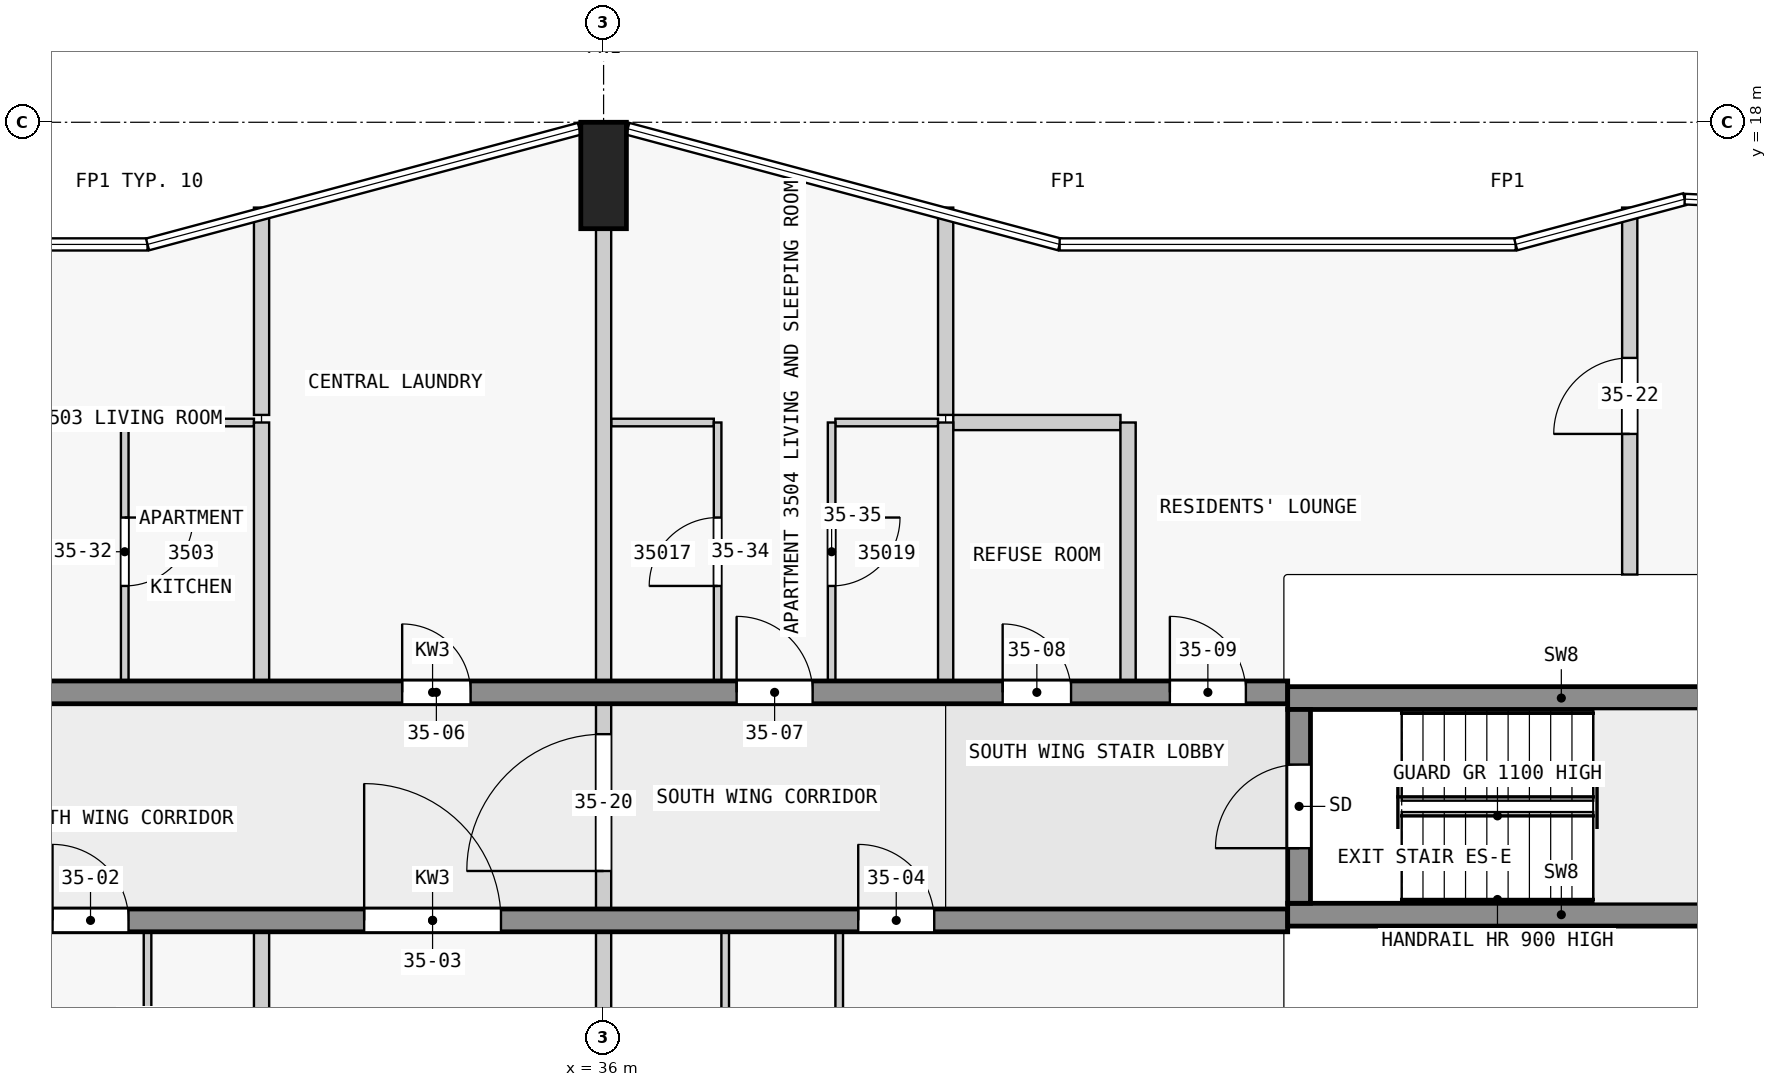
"""IFC4 building model, lengths in metres.
Left out: names, types, materials, properties, quantities, classifications, styles, units other than length and angle.
Written with IfcOpenShell. Run it as: python <this file> out.ifc"""

import sys

from ifc_helpers import new_model, si_unit, direction, frame, frame_2d, origin, origin_2d, place, context, subcontext, project, spatial, rectangle, extrude, element, fill, save


model = new_model("IFC4")
c1 = context("Model", 3, precision=1e-05, world=origin(), true_north=direction((0.0, 1.0)))
c2 = subcontext(c1, "Body", "Model", "MODEL_VIEW")
j1 = project(units=[si_unit("LENGTHUNIT", "METRE"), si_unit("PLANEANGLEUNIT", "RADIAN")], contexts=[c1])
p1 = place(None, origin())
s1 = spatial("IfcSite", under=j1, at=p1, CompositionType="ELEMENT")
p2 = place(p1, origin())
s2 = spatial("IfcBuilding", under=s1, at=p2, CompositionType="ELEMENT")
p3 = place(p2, frame((0.0, 0.0, 139.4)))
s3 = spatial("IfcBuildingStorey", under=s2, at=p3, CompositionType="ELEMENT", Elevation=139.4)
p4 = place(p3, frame((36.0, 17.3, 0.0), z_axis=(0.0, 0.0, 1.0), x_axis=(1.0, 0.0, 0.0)))
e1 = element("IfcColumn", 1, at=p4, inside=s3, PredefinedType="COLUMN", context=c2, shape_type="SweptSolid", body=[
    extrude(rectangle(XDim=0.6, YDim=1.4, at=origin_2d()), origin(), (0.0, 0.0, 1.0), 3.5),
])
p5 = place(p3, frame((45.15, 7.725, 0.0), z_axis=(0.0, 0.0, 1.0), x_axis=(0.0, 1.0, 0.0)))
e2 = element("IfcWall", 2, at=p5, inside=s3, PredefinedType="SHEAR", context=c2, shape_type="SweptSolid", body=[
    extrude(rectangle(XDim=2.55, YDim=0.3, at=frame_2d((1.275, 0.0))), origin(), (0.0, 0.0, 1.0), 3.5),
])
p6 = place(p5, frame((0.725, 0.0, 0.0)))
e3 = element("IfcOpeningElement", 3, at=p6, cuts=e2, PredefinedType="OPENING", context=c2, shape_type="SweptSolid", body=[
    extrude(rectangle(XDim=1.1, YDim=2.1, at=frame_2d((0.55, 1.05))), frame((0.0, 0.16, 0.0), z_axis=(0.0, -1.0, 0.0), x_axis=(1.0, 0.0, 0.0)), (0.0, 0.0, 1.0), 0.32),
])
for number, where, z_axis, x_axis in (
    (4, (45.0, 7.575, 0.0), (0.0, 0.0, 1.0), (1.0, 0.0, 0.0)),
    (5, (45.0, 10.425, 0.0), (0.0, 0.0, 1.0), (1.0, 0.0, 0.0)),
):
    element("IfcWall", number, at=place(p3, frame(where, z_axis=z_axis, x_axis=x_axis)), inside=s3, PredefinedType="SHEAR", context=c2, shape_type="SweptSolid", body=[
        extrude(rectangle(XDim=7.2, YDim=0.3, at=frame_2d((3.6, 0.0))), origin(), (0.0, 0.0, 1.0), 3.5),
    ])
p7 = place(p3, frame((22.5, 7.5, 0.0), z_axis=(0.0, 0.0, 1.0), x_axis=(1.0, 0.0, 0.0)))
e6 = element("IfcWall", 6, at=p7, inside=s3, PredefinedType="SHEAR", context=c2, shape_type="SweptSolid", body=[
    extrude(rectangle(XDim=22.5, YDim=0.3, at=frame_2d((11.25, 0.0))), origin(), (0.0, 0.0, 1.0), 3.25),
])
p8 = place(p7, frame((1.75, 0.0, 0.0)))
e7 = element("IfcOpeningElement", 7, at=p8, cuts=e6, PredefinedType="OPENING", context=c2, shape_type="SweptSolid", body=[
    extrude(rectangle(XDim=1.0, YDim=2.1, at=frame_2d((0.5, 1.05))), frame((0.0, 0.16, 0.0), z_axis=(0.0, -1.0, 0.0), x_axis=(1.0, 0.0, 0.0)), (0.0, 0.0, 1.0), 0.32),
])
p9 = place(p7, frame((6.25, 0.0, 0.0)))
e8 = element("IfcOpeningElement", 8, at=p9, cuts=e6, PredefinedType="OPENING", context=c2, shape_type="SweptSolid", body=[
    extrude(rectangle(XDim=1.0, YDim=2.1, at=frame_2d((0.5, 1.05))), frame((0.0, 0.16, 0.0), z_axis=(0.0, -1.0, 0.0), x_axis=(1.0, 0.0, 0.0)), (0.0, 0.0, 1.0), 0.32),
])
p10 = place(p7, frame((10.35, 0.0, 0.0)))
e9 = element("IfcOpeningElement", 9, at=p10, cuts=e6, PredefinedType="OPENING", context=c2, shape_type="SweptSolid", body=[
    extrude(rectangle(XDim=1.8, YDim=2.1, at=frame_2d((0.9, 1.05))), frame((0.0, 0.16, 0.0), z_axis=(0.0, -1.0, 0.0), x_axis=(1.0, 0.0, 0.0)), (0.0, 0.0, 1.0), 0.32),
])
p11 = place(p7, frame((16.85, 0.0, 0.0)))
e10 = element("IfcOpeningElement", 10, at=p11, cuts=e6, PredefinedType="OPENING", context=c2, shape_type="SweptSolid", body=[
    extrude(rectangle(XDim=1.0, YDim=2.1, at=frame_2d((0.5, 1.05))), frame((0.0, 0.16, 0.0), z_axis=(0.0, -1.0, 0.0), x_axis=(1.0, 0.0, 0.0)), (0.0, 0.0, 1.0), 0.32),
])
p12 = place(p3, frame((22.5, 10.5, 0.0), z_axis=(0.0, 0.0, 1.0), x_axis=(1.0, 0.0, 0.0)))
e11 = element("IfcWall", 11, at=p12, inside=s3, PredefinedType="SHEAR", context=c2, shape_type="SweptSolid", body=[
    extrude(rectangle(XDim=22.5, YDim=0.3, at=frame_2d((11.25, 0.0))), origin(), (0.0, 0.0, 1.0), 3.25),
])
p13 = place(p12, frame((4.05, 0.0, 0.0)))
e12 = element("IfcOpeningElement", 12, at=p13, cuts=e11, PredefinedType="OPENING", context=c2, shape_type="SweptSolid", body=[
    extrude(rectangle(XDim=1.0, YDim=2.1, at=frame_2d((0.5, 1.05))), frame((0.0, 0.16, 0.0), z_axis=(0.0, -1.0, 0.0), x_axis=(1.0, 0.0, 0.0)), (0.0, 0.0, 1.0), 0.32),
])
p14 = place(p12, frame((10.85, 0.0, 0.0)))
e13 = element("IfcOpeningElement", 13, at=p14, cuts=e11, PredefinedType="OPENING", context=c2, shape_type="SweptSolid", body=[
    extrude(rectangle(XDim=0.9, YDim=2.1, at=frame_2d((0.45, 1.05))), frame((0.0, 0.16, 0.0), z_axis=(0.0, -1.0, 0.0), x_axis=(1.0, 0.0, 0.0)), (0.0, 0.0, 1.0), 0.32),
])
p15 = place(p12, frame((15.25, 0.0, 0.0)))
e14 = element("IfcOpeningElement", 14, at=p15, cuts=e11, PredefinedType="OPENING", context=c2, shape_type="SweptSolid", body=[
    extrude(rectangle(XDim=1.0, YDim=2.1, at=frame_2d((0.5, 1.05))), frame((0.0, 0.16, 0.0), z_axis=(0.0, -1.0, 0.0), x_axis=(1.0, 0.0, 0.0)), (0.0, 0.0, 1.0), 0.32),
])
p16 = place(p12, frame((18.75, 0.0, 0.0)))
e15 = element("IfcOpeningElement", 15, at=p16, cuts=e11, PredefinedType="OPENING", context=c2, shape_type="SweptSolid", body=[
    extrude(rectangle(XDim=0.9, YDim=2.1, at=frame_2d((0.45, 1.05))), frame((0.0, 0.16, 0.0), z_axis=(0.0, -1.0, 0.0), x_axis=(1.0, 0.0, 0.0)), (0.0, 0.0, 1.0), 0.32),
])
p17 = place(p12, frame((20.95, 0.0, 0.0)))
e16 = element("IfcOpeningElement", 16, at=p17, cuts=e11, PredefinedType="OPENING", context=c2, shape_type="SweptSolid", body=[
    extrude(rectangle(XDim=1.0, YDim=2.1, at=frame_2d((0.5, 1.05))), frame((0.0, 0.16, 0.0), z_axis=(0.0, -1.0, 0.0), x_axis=(1.0, 0.0, 0.0)), (0.0, 0.0, 1.0), 0.32),
])
p18 = place(p3, frame((31.4, 14.05, 0.0), z_axis=(0.0, 0.0, 1.0), x_axis=(-1.0, 0.0, 0.0)))
e17 = element("IfcWall", 17, at=p18, inside=s3, PredefinedType="PARTITIONING", context=c2, shape_type="SweptSolid", body=[
    extrude(rectangle(XDim=1.65, YDim=0.1, at=frame_2d((0.825, 0.0))), origin(), (0.0, 0.0, 1.0), 3.25),
])
for number, where, z_axis, x_axis in (
    (18, (37.45, 14.05, 0.0), (0.0, 0.0, 1.0), (-1.0, 0.0, 0.0)),
    (19, (40.4, 14.05, 0.0), (0.0, 0.0, 1.0), (-1.0, 0.0, 0.0)),
):
    element("IfcWall", number, at=place(p3, frame(where, z_axis=z_axis, x_axis=x_axis)), inside=s3, PredefinedType="PARTITIONING", context=c2, shape_type="SweptSolid", body=[
        extrude(rectangle(XDim=1.35, YDim=0.1, at=frame_2d((0.675, 0.0))), origin(), (0.0, 0.0, 1.0), 3.25),
    ])
p19 = place(p3, frame((42.8, 14.05, 0.0), z_axis=(0.0, 0.0, 1.0), x_axis=(-1.0, 0.0, 0.0)))
e20 = element("IfcWall", 20, at=p19, inside=s3, PredefinedType="PARTITIONING", context=c2, shape_type="SweptSolid", body=[
    extrude(rectangle(XDim=2.2, YDim=0.2, at=frame_2d((1.1, 0.0))), origin(), (0.0, 0.0, 1.0), 3.25),
])
p20 = place(p3, frame((29.7, 14.05, 0.0), z_axis=(0.0, 0.0, 1.0), x_axis=(0.0, -1.0, 0.0)))
e21 = element("IfcWall", 21, at=p20, inside=s3, PredefinedType="PARTITIONING", context=c2, shape_type="SweptSolid", body=[
    extrude(rectangle(XDim=3.4, YDim=0.1, at=frame_2d((1.7, 0.0))), origin(), (0.0, 0.0, 1.0), 3.25),
])
p21 = place(p20, frame((1.25, 0.0, 0.0)))
e22 = element("IfcOpeningElement", 22, at=p21, cuts=e21, PredefinedType="OPENING", context=c2, shape_type="SweptSolid", body=[
    extrude(rectangle(XDim=0.9, YDim=2.1, at=frame_2d((0.45, 1.05))), frame((0.0, 0.06, 0.0), z_axis=(0.0, -1.0, 0.0), x_axis=(1.0, 0.0, 0.0)), (0.0, 0.0, 1.0), 0.12),
])
p22 = place(p3, frame((30.0, 7.35, 0.0), z_axis=(0.0, 0.0, 1.0), x_axis=(0.0, -1.0, 0.0)))
e23 = element("IfcWall", 23, at=p22, inside=s3, PredefinedType="PARTITIONING", context=c2, shape_type="SweptSolid", body=[
    extrude(rectangle(XDim=3.4, YDim=0.1, at=frame_2d((1.7, 0.0))), origin(), (0.0, 0.0, 1.0), 3.25),
])
p23 = place(p22, frame((1.25, 0.0, 0.0)))
e24 = element("IfcOpeningElement", 24, at=p23, cuts=e23, PredefinedType="OPENING", context=c2, shape_type="SweptSolid", body=[
    extrude(rectangle(XDim=0.9, YDim=2.1, at=frame_2d((0.45, 1.05))), frame((0.0, 0.06, 0.0), z_axis=(0.0, -1.0, 0.0), x_axis=(1.0, 0.0, 0.0)), (0.0, 0.0, 1.0), 0.12),
])
p24 = place(p3, frame((31.5, 16.878, 0.0), z_axis=(0.0, 0.0, 1.0), x_axis=(0.0, -1.0, 0.0)))
e25 = element("IfcWall", 25, at=p24, inside=s3, PredefinedType="PARTITIONING", context=c2, shape_type="SweptSolid", body=[
    extrude(rectangle(XDim=2.728, YDim=0.2, at=frame_2d((1.364, 0.0))), origin(), (0.0, 0.0, 1.0), 3.25),
])
for number, where, z_axis, x_axis in (
    (26, (31.5, 3.95, 0.0), (0.0, 0.0, 1.0), (0.0, 1.0, 0.0)),
    (27, (31.5, 10.65, 0.0), (0.0, 0.0, 1.0), (0.0, 1.0, 0.0)),
):
    element("IfcWall", number, at=place(p3, frame(where, z_axis=z_axis, x_axis=x_axis)), inside=s3, PredefinedType="PARTITIONING", context=c2, shape_type="SweptSolid", body=[
        extrude(rectangle(XDim=3.4, YDim=0.2, at=frame_2d((1.7, 0.0))), origin(), (0.0, 0.0, 1.0), 3.25),
    ])
for number, where, z_axis, x_axis in (
    (28, (36.0, 1.4, 0.0), (0.0, 0.0, 1.0), (0.0, 1.0, 0.0)),
    (29, (36.0, 10.65, 0.0), (0.0, 0.0, 1.0), (0.0, 1.0, 0.0)),
):
    element("IfcWall", number, at=place(p3, frame(where, z_axis=z_axis, x_axis=x_axis)), inside=s3, PredefinedType="PARTITIONING", context=c2, shape_type="SweptSolid", body=[
        extrude(rectangle(XDim=5.95, YDim=0.2, at=frame_2d((2.975, 0.0))), origin(), (0.0, 0.0, 1.0), 3.25),
    ])
p25 = place(p3, frame((37.5, 10.65, 0.0), z_axis=(0.0, 0.0, 1.0), x_axis=(0.0, 1.0, 0.0)))
e30 = element("IfcWall", 30, at=p25, inside=s3, PredefinedType="PARTITIONING", context=c2, shape_type="SweptSolid", body=[
    extrude(rectangle(XDim=3.4, YDim=0.1, at=frame_2d((1.7, 0.0))), origin(), (0.0, 0.0, 1.0), 3.25),
])
p26 = place(p25, frame((1.25, 0.0, 0.0)))
e31 = element("IfcOpeningElement", 31, at=p26, cuts=e30, PredefinedType="OPENING", context=c2, shape_type="SweptSolid", body=[
    extrude(rectangle(XDim=0.9, YDim=2.1, at=frame_2d((0.45, 1.05))), frame((0.0, 0.06, 0.0), z_axis=(0.0, -1.0, 0.0), x_axis=(1.0, 0.0, 0.0)), (0.0, 0.0, 1.0), 0.12),
])
p27 = place(p3, frame((37.6, 3.95, 0.0), z_axis=(0.0, 0.0, 1.0), x_axis=(0.0, 1.0, 0.0)))
e32 = element("IfcWall", 32, at=p27, inside=s3, PredefinedType="PARTITIONING", context=c2, shape_type="SweptSolid", body=[
    extrude(rectangle(XDim=3.4, YDim=0.1, at=frame_2d((1.7, 0.0))), origin(), (0.0, 0.0, 1.0), 3.25),
])
p28 = place(p3, frame((39.0, 14.05, 0.0), z_axis=(0.0, 0.0, 1.0), x_axis=(0.0, -1.0, 0.0)))
e33 = element("IfcWall", 33, at=p28, inside=s3, PredefinedType="PARTITIONING", context=c2, shape_type="SweptSolid", body=[
    extrude(rectangle(XDim=3.4, YDim=0.1, at=frame_2d((1.7, 0.0))), origin(), (0.0, 0.0, 1.0), 3.25),
])
p29 = place(p28, frame((1.25, 0.0, 0.0)))
e34 = element("IfcOpeningElement", 34, at=p29, cuts=e33, PredefinedType="OPENING", context=c2, shape_type="SweptSolid", body=[
    extrude(rectangle(XDim=0.9, YDim=2.1, at=frame_2d((0.45, 1.05))), frame((0.0, 0.06, 0.0), z_axis=(0.0, -1.0, 0.0), x_axis=(1.0, 0.0, 0.0)), (0.0, 0.0, 1.0), 0.12),
])
p30 = place(p3, frame((39.1, 3.95, 0.0), z_axis=(0.0, 0.0, 1.0), x_axis=(0.0, 1.0, 0.0)))
e35 = element("IfcWall", 35, at=p30, inside=s3, PredefinedType="PARTITIONING", context=c2, shape_type="SweptSolid", body=[
    extrude(rectangle(XDim=3.4, YDim=0.1, at=frame_2d((1.7, 0.0))), origin(), (0.0, 0.0, 1.0), 3.25),
])
p31 = place(p30, frame((1.25, 0.0, 0.0)))
e36 = element("IfcOpeningElement", 36, at=p31, cuts=e35, PredefinedType="OPENING", context=c2, shape_type="SweptSolid", body=[
    extrude(rectangle(XDim=0.9, YDim=2.1, at=frame_2d((0.45, 1.05))), frame((0.0, 0.06, 0.0), z_axis=(0.0, -1.0, 0.0), x_axis=(1.0, 0.0, 0.0)), (0.0, 0.0, 1.0), 0.12),
])
p32 = place(p3, frame((40.5, 16.878, 0.0), z_axis=(0.0, 0.0, 1.0), x_axis=(0.0, -1.0, 0.0)))
e37 = element("IfcWall", 37, at=p32, inside=s3, PredefinedType="PARTITIONING", context=c2, shape_type="SweptSolid", body=[
    extrude(rectangle(XDim=2.728, YDim=0.2, at=frame_2d((1.364, 0.0))), origin(), (0.0, 0.0, 1.0), 3.25),
])
for number, where, z_axis, x_axis in (
    (38, (40.5, 10.65, 0.0), (0.0, 0.0, 1.0), (0.0, 1.0, 0.0)),
    (39, (42.9, 10.65, 0.0), (0.0, 0.0, 1.0), (0.0, 1.0, 0.0)),
):
    element("IfcWall", number, at=place(p3, frame(where, z_axis=z_axis, x_axis=x_axis)), inside=s3, PredefinedType="PARTITIONING", context=c2, shape_type="SweptSolid", body=[
        extrude(rectangle(XDim=3.4, YDim=0.2, at=frame_2d((1.7, 0.0))), origin(), (0.0, 0.0, 1.0), 3.25),
    ])
p33 = place(p3, frame((49.5, 12.05, 0.0), z_axis=(0.0, 0.0, 1.0), x_axis=(0.0, 1.0, 0.0)))
e40 = element("IfcWall", 40, at=p33, inside=s3, PredefinedType="PARTITIONING", context=c2, shape_type="SweptSolid", body=[
    extrude(rectangle(XDim=4.828, YDim=0.2, at=frame_2d((2.414, 0.0))), origin(), (0.0, 0.0, 1.0), 3.25),
])
p34 = place(p33, frame((1.85, 0.0, 0.0)))
e41 = element("IfcOpeningElement", 41, at=p34, cuts=e40, PredefinedType="OPENING", context=c2, shape_type="SweptSolid", body=[
    extrude(rectangle(XDim=1.0, YDim=2.1, at=frame_2d((0.5, 1.05))), frame((0.0, 0.11, 0.0), z_axis=(0.0, -1.0, 0.0), x_axis=(1.0, 0.0, 0.0)), (0.0, 0.0, 1.0), 0.22),
])
p35 = place(p3, frame((36.0, 7.45, 0.0), z_axis=(0.0, 0.0, 1.0), x_axis=(0.0, 1.0, 0.0)))
e42 = element("IfcWall", 42, at=p35, inside=s3, PredefinedType="PARTITIONING", context=c2, shape_type="SweptSolid", body=[
    extrude(rectangle(XDim=3.1, YDim=0.2, at=frame_2d((1.55, 0.0))), origin(), (0.0, 0.0, 1.0), 3.25),
])
p36 = place(p35, frame((0.7, 0.0, 0.0)))
e43 = element("IfcOpeningElement", 43, at=p36, cuts=e42, PredefinedType="OPENING", context=c2, shape_type="SweptSolid", body=[
    extrude(rectangle(XDim=1.8, YDim=2.1, at=frame_2d((0.9, 1.05))), frame((0.0, 0.11, 0.0), z_axis=(0.0, -1.0, 0.0), x_axis=(1.0, 0.0, 0.0)), (0.0, 0.0, 1.0), 0.22),
])
p37 = place(p6, origin())
e44 = element("IfcDoor", 44, at=p37, inside=s3, OperationType="SINGLE_SWING_LEFT", PredefinedType="DOOR", context=c2, shape_type="SweptSolid", body=[
    extrude(rectangle(XDim=1.1, YDim=2.1, at=frame_2d((0.55, 1.05))), frame((0.0, 0.025, 0.0), z_axis=(0.0, -1.0, 0.0), x_axis=(1.0, 0.0, 0.0)), (0.0, 0.0, 1.0), 0.05),
])
fill(e3, e44)
p38 = place(p9, origin())
e45 = element("IfcDoor", 45, at=p38, inside=s3, OperationType="SINGLE_SWING_LEFT", PredefinedType="DOOR", context=c2, shape_type="SweptSolid", body=[
    extrude(rectangle(XDim=1.0, YDim=2.1, at=frame_2d((0.5, 1.05))), frame((0.0, 0.025, 0.0), z_axis=(0.0, -1.0, 0.0), x_axis=(1.0, 0.0, 0.0)), (0.0, 0.0, 1.0), 0.05),
])
fill(e8, e45)
p39 = place(p10, origin())
e46 = element("IfcDoor", 46, at=p39, inside=s3, OperationType="SINGLE_SWING_LEFT", PredefinedType="DOOR", context=c2, shape_type="SweptSolid", body=[
    extrude(rectangle(XDim=1.8, YDim=2.1, at=frame_2d((0.9, 1.05))), frame((0.0, 0.025, 0.0), z_axis=(0.0, -1.0, 0.0), x_axis=(1.0, 0.0, 0.0)), (0.0, 0.0, 1.0), 0.05),
])
fill(e9, e46)
p40 = place(p11, origin())
e47 = element("IfcDoor", 47, at=p40, inside=s3, OperationType="SINGLE_SWING_RIGHT", PredefinedType="DOOR", context=c2, shape_type="SweptSolid", body=[
    extrude(rectangle(XDim=1.0, YDim=2.1, at=frame_2d((0.5, 1.05))), frame((0.0, 0.025, 0.0), z_axis=(0.0, -1.0, 0.0), x_axis=(1.0, 0.0, 0.0)), (0.0, 0.0, 1.0), 0.05),
])
fill(e10, e47)
p41 = place(p14, origin())
e48 = element("IfcDoor", 48, at=p41, inside=s3, OperationType="SINGLE_SWING_RIGHT", PredefinedType="DOOR", context=c2, shape_type="SweptSolid", body=[
    extrude(rectangle(XDim=0.9, YDim=2.1, at=frame_2d((0.45, 1.05))), frame((0.0, 0.025, 0.0), z_axis=(0.0, -1.0, 0.0), x_axis=(1.0, 0.0, 0.0)), (0.0, 0.0, 1.0), 0.05),
])
fill(e13, e48)
p42 = place(p15, origin())
e49 = element("IfcDoor", 49, at=p42, inside=s3, OperationType="SINGLE_SWING_RIGHT", PredefinedType="DOOR", context=c2, shape_type="SweptSolid", body=[
    extrude(rectangle(XDim=1.0, YDim=2.1, at=frame_2d((0.5, 1.05))), frame((0.0, 0.025, 0.0), z_axis=(0.0, -1.0, 0.0), x_axis=(1.0, 0.0, 0.0)), (0.0, 0.0, 1.0), 0.05),
])
fill(e14, e49)
p43 = place(p16, origin())
e50 = element("IfcDoor", 50, at=p43, inside=s3, OperationType="SINGLE_SWING_RIGHT", PredefinedType="DOOR", context=c2, shape_type="SweptSolid", body=[
    extrude(rectangle(XDim=0.9, YDim=2.1, at=frame_2d((0.45, 1.05))), frame((0.0, 0.025, 0.0), z_axis=(0.0, -1.0, 0.0), x_axis=(1.0, 0.0, 0.0)), (0.0, 0.0, 1.0), 0.05),
])
fill(e15, e50)
p44 = place(p17, origin())
e51 = element("IfcDoor", 51, at=p44, inside=s3, OperationType="SINGLE_SWING_RIGHT", PredefinedType="DOOR", context=c2, shape_type="SweptSolid", body=[
    extrude(rectangle(XDim=1.0, YDim=2.1, at=frame_2d((0.5, 1.05))), frame((0.0, 0.025, 0.0), z_axis=(0.0, -1.0, 0.0), x_axis=(1.0, 0.0, 0.0)), (0.0, 0.0, 1.0), 0.05),
])
fill(e16, e51)
p45 = place(p36, origin())
e52 = element("IfcDoor", 52, at=p45, inside=s3, OperationType="SINGLE_SWING_RIGHT", PredefinedType="DOOR", context=c2, shape_type="SweptSolid", body=[
    extrude(rectangle(XDim=1.8, YDim=2.1, at=frame_2d((0.9, 1.05))), frame((0.0, 0.025, 0.0), z_axis=(0.0, -1.0, 0.0), x_axis=(1.0, 0.0, 0.0)), (0.0, 0.0, 1.0), 0.05),
])
fill(e43, e52)
p46 = place(p34, origin())
e53 = element("IfcDoor", 53, at=p46, inside=s3, OperationType="SINGLE_SWING_LEFT", PredefinedType="DOOR", context=c2, shape_type="SweptSolid", body=[
    extrude(rectangle(XDim=1.0, YDim=2.1, at=frame_2d((0.5, 1.05))), frame((0.0, 0.025, 0.0), z_axis=(0.0, -1.0, 0.0), x_axis=(1.0, 0.0, 0.0)), (0.0, 0.0, 1.0), 0.05),
])
fill(e41, e53)
p47 = place(p21, origin())
e54 = element("IfcDoor", 54, at=p47, inside=s3, OperationType="SINGLE_SWING_LEFT", PredefinedType="DOOR", context=c2, shape_type="SweptSolid", body=[
    extrude(rectangle(XDim=0.9, YDim=2.1, at=frame_2d((0.45, 1.05))), frame((0.0, 0.025, 0.0), z_axis=(0.0, -1.0, 0.0), x_axis=(1.0, 0.0, 0.0)), (0.0, 0.0, 1.0), 0.05),
])
fill(e22, e54)
p48 = place(p26, origin())
e55 = element("IfcDoor", 55, at=p48, inside=s3, OperationType="SINGLE_SWING_LEFT", PredefinedType="DOOR", context=c2, shape_type="SweptSolid", body=[
    extrude(rectangle(XDim=0.9, YDim=2.1, at=frame_2d((0.45, 1.05))), frame((0.0, 0.025, 0.0), z_axis=(0.0, -1.0, 0.0), x_axis=(1.0, 0.0, 0.0)), (0.0, 0.0, 1.0), 0.05),
])
fill(e31, e55)
p49 = place(p29, origin())
e56 = element("IfcDoor", 56, at=p49, inside=s3, OperationType="SINGLE_SWING_LEFT", PredefinedType="DOOR", context=c2, shape_type="SweptSolid", body=[
    extrude(rectangle(XDim=0.9, YDim=2.1, at=frame_2d((0.45, 1.05))), frame((0.0, 0.025, 0.0), z_axis=(0.0, -1.0, 0.0), x_axis=(1.0, 0.0, 0.0)), (0.0, 0.0, 1.0), 0.05),
])
fill(e34, e56)
save(model, sys.argv[1])
